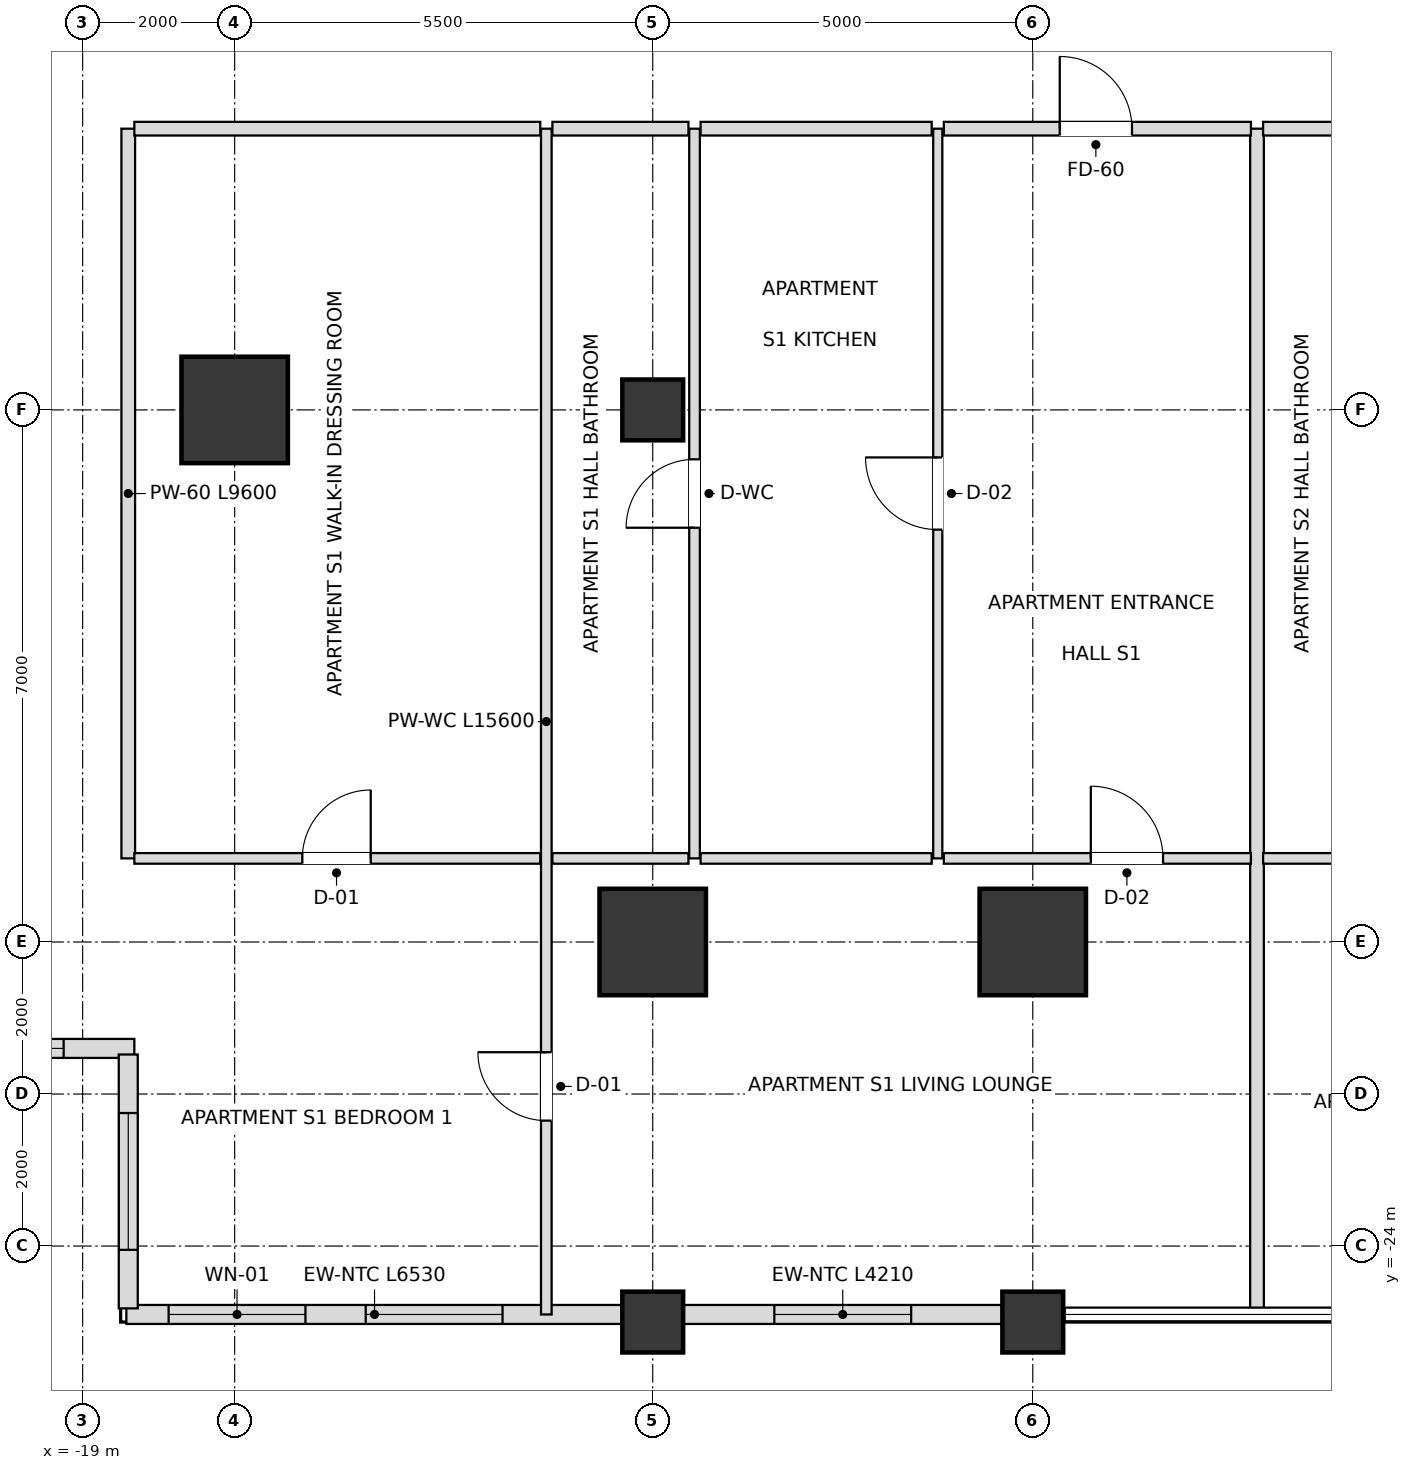
"""IFC4 building model, lengths in metres.
Left out: names, types, materials, properties, quantities, classifications, styles, units other than length and angle.
Written with IfcOpenShell. Run it as: python <this file> out.ifc"""

import sys

from ifc_helpers import new_model, si_unit, direction, frame, frame_2d, origin, origin_2d, place, context, subcontext, project, spatial, rectangle, extrude, element, fill, save


model = new_model("IFC4")
c1 = context("Model", 3, precision=1e-05, world=origin(), true_north=direction((0.0, 1.0)))
c2 = subcontext(c1, "Body", "Model", "MODEL_VIEW")
j1 = project(units=[si_unit("LENGTHUNIT", "METRE"), si_unit("PLANEANGLEUNIT", "RADIAN")], contexts=[c1])
p1 = place(None, origin())
s1 = spatial("IfcSite", under=j1, at=p1, CompositionType="ELEMENT")
p2 = place(p1, origin())
s2 = spatial("IfcBuilding", under=s1, at=p2, CompositionType="ELEMENT")
p3 = place(p2, frame((0.0, 0.0, 43.2)))
s3 = spatial("IfcBuildingStorey", under=s2, at=p3, CompositionType="ELEMENT", Elevation=43.2)
for number, where, z_axis, x_axis in (
    (1, (-11.5, -20.0, 0.0), (0.0, 0.0, 1.0), (1.0, 0.0, 0.0)),
    (2, (-6.5, -20.0, 0.0), (0.0, 0.0, 1.0), (1.0, 0.0, 0.0)),
    (3, (-17.0, -13.0, 0.0), (0.0, 0.0, 1.0), (1.0, 0.0, 0.0)),
):
    element("IfcColumn", number, at=place(p3, frame(where, z_axis=z_axis, x_axis=x_axis)), inside=s3, PredefinedType="USERDEFINED", context=c2, shape_type="SweptSolid", body=[
        extrude(rectangle(XDim=1.4, YDim=1.4, at=origin_2d()), origin(), (0.0, 0.0, 1.0), 3.6),
    ])
for number, where, z_axis, x_axis in (
    (4, (-11.5, -13.0, 0.0), (0.0, 0.0, 1.0), (1.0, 0.0, 0.0)),
    (5, (-11.5, -25.0, 0.0), (0.0, 0.0, 1.0), (1.0, 0.0, 0.0)),
    (6, (-6.5, -25.0, 0.0), (0.0, 0.0, 1.0), (1.0, 0.0, 0.0)),
):
    element("IfcColumn", number, at=place(p3, frame(where, z_axis=z_axis, x_axis=x_axis)), inside=s3, PredefinedType="COLUMN", context=c2, shape_type="SweptSolid", body=[
        extrude(rectangle(XDim=0.8, YDim=0.8, at=origin_2d()), origin(), (0.0, 0.0, 1.0), 3.6),
    ])
p4 = place(p3, frame((-18.425, -24.9, 0.0), z_axis=(0.0, 0.0, 1.0), x_axis=(1.0, 0.0, 0.0)))
e7 = element("IfcWall", 7, at=p4, inside=s3, PredefinedType="SOLIDWALL", context=c2, shape_type="SweptSolid", body=[
    extrude(rectangle(XDim=6.53, YDim=0.25, at=frame_2d((3.265, 0.0))), origin(), (0.0, 0.0, 1.0), 2.736),
])
p5 = place(p4, frame((0.556, 0.0, 0.72)))
e8 = element("IfcOpeningElement", 8, at=p5, cuts=e7, PredefinedType="OPENING", context=c2, shape_type="SweptSolid", body=[
    extrude(rectangle(XDim=1.8, YDim=1.68, at=frame_2d((0.9, 0.84))), frame((0.0, 0.135, 0.0), z_axis=(0.0, -1.0, 0.0), x_axis=(1.0, 0.0, 0.0)), (0.0, 0.0, 1.0), 0.27),
])
p6 = place(p4, frame((3.149, 0.0, 0.72)))
e9 = element("IfcOpeningElement", 9, at=p6, cuts=e7, PredefinedType="OPENING", context=c2, shape_type="SweptSolid", body=[
    extrude(rectangle(XDim=1.8, YDim=1.68, at=frame_2d((0.9, 0.84))), frame((0.0, 0.135, 0.0), z_axis=(0.0, -1.0, 0.0), x_axis=(1.0, 0.0, 0.0)), (0.0, 0.0, 1.0), 0.27),
])
p7 = place(p3, frame((-11.105, -24.9, 0.0), z_axis=(0.0, 0.0, 1.0), x_axis=(1.0, 0.0, 0.0)))
e10 = element("IfcWall", 10, at=p7, inside=s3, PredefinedType="SOLIDWALL", context=c2, shape_type="SweptSolid", body=[
    extrude(rectangle(XDim=4.21, YDim=0.25, at=frame_2d((2.105, 0.0))), origin(), (0.0, 0.0, 1.0), 2.736),
])
p8 = place(p7, frame((1.205, 0.0, 0.72)))
e11 = element("IfcOpeningElement", 11, at=p8, cuts=e10, PredefinedType="OPENING", context=c2, shape_type="SweptSolid", body=[
    extrude(rectangle(XDim=1.8, YDim=1.68, at=frame_2d((0.9, 0.84))), frame((0.0, 0.135, 0.0), z_axis=(0.0, -1.0, 0.0), x_axis=(1.0, 0.0, 0.0)), (0.0, 0.0, 1.0), 0.27),
])
p9 = place(p3, frame((-21.98, -21.4, 0.0), z_axis=(0.0, 0.0, 1.0), x_axis=(1.0, 0.0, 0.0)))
e12 = element("IfcWall", 12, at=p9, inside=s3, PredefinedType="SOLIDWALL", context=c2, shape_type="SweptSolid", body=[
    extrude(rectangle(XDim=3.66, YDim=0.25, at=frame_2d((1.83, 0.0))), origin(), (0.0, 0.0, 1.0), 2.736),
])
p10 = place(p9, frame((0.93, 0.0, 0.72)))
e13 = element("IfcOpeningElement", 13, at=p10, cuts=e12, PredefinedType="OPENING", context=c2, shape_type="SweptSolid", body=[
    extrude(rectangle(XDim=1.8, YDim=1.68, at=frame_2d((0.9, 0.84))), frame((0.0, 0.135, 0.0), z_axis=(0.0, -1.0, 0.0), x_axis=(1.0, 0.0, 0.0)), (0.0, 0.0, 1.0), 0.27),
])
p11 = place(p3, frame((-18.4, -21.48, 0.0), z_axis=(0.0, 0.0, 1.0), x_axis=(0.0, -1.0, 0.0)))
e14 = element("IfcWall", 14, at=p11, inside=s3, PredefinedType="SOLIDWALL", context=c2, shape_type="SweptSolid", body=[
    extrude(rectangle(XDim=3.34, YDim=0.25, at=frame_2d((1.67, 0.0))), origin(), (0.0, 0.0, 1.0), 2.736),
])
p12 = place(p11, frame((0.77, 0.0, 0.72)))
e15 = element("IfcOpeningElement", 15, at=p12, cuts=e14, PredefinedType="OPENING", context=c2, shape_type="SweptSolid", body=[
    extrude(rectangle(XDim=1.8, YDim=1.68, at=frame_2d((0.9, 0.84))), frame((0.0, 0.135, 0.0), z_axis=(0.0, -1.0, 0.0), x_axis=(1.0, 0.0, 0.0)), (0.0, 0.0, 1.0), 0.27),
])
p13 = place(p3, frame((-18.4, -18.9, 0.0), z_axis=(0.0, 0.0, 1.0), x_axis=(0.0, 1.0, 0.0)))
e16 = element("IfcWall", 16, at=p13, inside=s3, PredefinedType="PARTITIONING", context=c2, shape_type="SweptSolid", body=[
    extrude(rectangle(XDim=9.6, YDim=0.18, at=frame_2d((4.8, 0.0))), origin(), (0.0, 0.0, 1.0), 2.736),
])
p14 = place(p3, frame((-12.9, -24.9, 0.0), z_axis=(0.0, 0.0, 1.0), x_axis=(0.0, 1.0, 0.0)))
e17 = element("IfcWall", 17, at=p14, inside=s3, PredefinedType="PARTITIONING", context=c2, shape_type="SweptSolid", body=[
    extrude(rectangle(XDim=15.6, YDim=0.14, at=frame_2d((7.8, 0.0))), origin(), (0.0, 0.0, 1.0), 2.736),
])
p15 = place(p14, frame((2.55, 0.0, 0.0)))
e18 = element("IfcOpeningElement", 18, at=p15, cuts=e17, PredefinedType="OPENING", context=c2, shape_type="SweptSolid", body=[
    extrude(rectangle(XDim=0.9, YDim=2.1, at=frame_2d((0.45, 1.05))), frame((0.0, 0.08, 0.0), z_axis=(0.0, -1.0, 0.0), x_axis=(1.0, 0.0, 0.0)), (0.0, 0.0, 1.0), 0.16),
])
p16 = place(p3, frame((-10.95, -18.9, 0.0), z_axis=(0.0, 0.0, 1.0), x_axis=(0.0, 1.0, 0.0)))
e19 = element("IfcWall", 19, at=p16, inside=s3, PredefinedType="PARTITIONING", context=c2, shape_type="SweptSolid", body=[
    extrude(rectangle(XDim=9.6, YDim=0.14, at=frame_2d((4.8, 0.0))), origin(), (0.0, 0.0, 1.0), 2.816),
])
p17 = place(p16, frame((4.35, 0.0, 0.0)))
e20 = element("IfcOpeningElement", 20, at=p17, cuts=e19, PredefinedType="OPENING", context=c2, shape_type="SweptSolid", body=[
    extrude(rectangle(XDim=0.9, YDim=2.1, at=frame_2d((0.45, 1.05))), frame((0.0, 0.08, 0.0), z_axis=(0.0, -1.0, 0.0), x_axis=(1.0, 0.0, 0.0)), (0.0, 0.0, 1.0), 0.16),
])
p18 = place(p3, frame((-7.75, -18.9, 0.0), z_axis=(0.0, 0.0, 1.0), x_axis=(0.0, 1.0, 0.0)))
e21 = element("IfcWall", 21, at=p18, inside=s3, PredefinedType="PARTITIONING", context=c2, shape_type="SweptSolid", body=[
    extrude(rectangle(XDim=9.6, YDim=0.12, at=frame_2d((4.8, 0.0))), origin(), (0.0, 0.0, 1.0), 2.816),
])
p19 = place(p18, frame((4.325, 0.0, 0.0)))
e22 = element("IfcOpeningElement", 22, at=p19, cuts=e21, PredefinedType="OPENING", context=c2, shape_type="SweptSolid", body=[
    extrude(rectangle(XDim=0.95, YDim=2.1, at=frame_2d((0.475, 1.05))), frame((0.0, 0.07, 0.0), z_axis=(0.0, -1.0, 0.0), x_axis=(1.0, 0.0, 0.0)), (0.0, 0.0, 1.0), 0.14),
])
p20 = place(p3, frame((-3.55, -24.9, 0.0), z_axis=(0.0, 0.0, 1.0), x_axis=(0.0, 1.0, 0.0)))
e23 = element("IfcWall", 23, at=p20, inside=s3, PredefinedType="PARTITIONING", context=c2, shape_type="SweptSolid", body=[
    extrude(rectangle(XDim=15.6, YDim=0.18, at=frame_2d((7.8, 0.0))), origin(), (0.0, 0.0, 1.0), 2.816),
])
p21 = place(p3, frame((-18.32, -18.9, 0.0), z_axis=(0.0, 0.0, 1.0), x_axis=(1.0, 0.0, 0.0)))
e24 = element("IfcWall", 24, at=p21, inside=s3, PredefinedType="PARTITIONING", context=c2, shape_type="SweptSolid", body=[
    extrude(rectangle(XDim=5.34, YDim=0.14, at=frame_2d((2.67, 0.0))), origin(), (0.0, 0.0, 1.0), 2.736),
])
p22 = place(p21, frame((2.21, 0.0, 0.0)))
e25 = element("IfcOpeningElement", 25, at=p22, cuts=e24, PredefinedType="OPENING", context=c2, shape_type="SweptSolid", body=[
    extrude(rectangle(XDim=0.9, YDim=2.1, at=frame_2d((0.45, 1.05))), frame((0.0, 0.08, 0.0), z_axis=(0.0, -1.0, 0.0), x_axis=(1.0, 0.0, 0.0)), (0.0, 0.0, 1.0), 0.16),
])
p23 = place(p3, frame((-12.82, -18.9, 0.0), z_axis=(0.0, 0.0, 1.0), x_axis=(1.0, 0.0, 0.0)))
e26 = element("IfcWall", 26, at=p23, inside=s3, PredefinedType="PARTITIONING", context=c2, shape_type="SweptSolid", body=[
    extrude(rectangle(XDim=1.79, YDim=0.14, at=frame_2d((0.895, 0.0))), origin(), (0.0, 0.0, 1.0), 2.736),
])
p24 = place(p3, frame((-10.87, -18.9, 0.0), z_axis=(0.0, 0.0, 1.0), x_axis=(1.0, 0.0, 0.0)))
e27 = element("IfcWall", 27, at=p24, inside=s3, PredefinedType="PARTITIONING", context=c2, shape_type="SweptSolid", body=[
    extrude(rectangle(XDim=3.04, YDim=0.14, at=frame_2d((1.52, 0.0))), origin(), (0.0, 0.0, 1.0), 3.38),
])
p25 = place(p3, frame((-7.67, -18.9, 0.0), z_axis=(0.0, 0.0, 1.0), x_axis=(1.0, 0.0, 0.0)))
e28 = element("IfcWall", 28, at=p25, inside=s3, PredefinedType="PARTITIONING", context=c2, shape_type="SweptSolid", body=[
    extrude(rectangle(XDim=4.04, YDim=0.14, at=frame_2d((2.02, 0.0))), origin(), (0.0, 0.0, 1.0), 2.816),
])
p26 = place(p25, frame((1.934, 0.0, 0.0)))
e29 = element("IfcOpeningElement", 29, at=p26, cuts=e28, PredefinedType="OPENING", context=c2, shape_type="SweptSolid", body=[
    extrude(rectangle(XDim=0.95, YDim=2.1, at=frame_2d((0.475, 1.05))), frame((0.0, 0.08, 0.0), z_axis=(0.0, -1.0, 0.0), x_axis=(1.0, 0.0, 0.0)), (0.0, 0.0, 1.0), 0.16),
])
p27 = place(p3, frame((-3.47, -18.9, 0.0), z_axis=(0.0, 0.0, 1.0), x_axis=(1.0, 0.0, 0.0)))
e30 = element("IfcWall", 30, at=p27, inside=s3, PredefinedType="PARTITIONING", context=c2, shape_type="SweptSolid", body=[
    extrude(rectangle(XDim=1.79, YDim=0.14, at=frame_2d((0.895, 0.0))), origin(), (0.0, 0.0, 1.0), 3.38),
])
p28 = place(p3, frame((-18.32, -9.3, 0.0), z_axis=(0.0, 0.0, 1.0), x_axis=(1.0, 0.0, 0.0)))
e31 = element("IfcWall", 31, at=p28, inside=s3, PredefinedType="PARTITIONING", context=c2, shape_type="SweptSolid", body=[
    extrude(rectangle(XDim=5.34, YDim=0.18, at=frame_2d((2.67, 0.0))), origin(), (0.0, 0.0, 1.0), 2.816),
])
p29 = place(p3, frame((-12.82, -9.3, 0.0), z_axis=(0.0, 0.0, 1.0), x_axis=(1.0, 0.0, 0.0)))
e32 = element("IfcWall", 32, at=p29, inside=s3, PredefinedType="PARTITIONING", context=c2, shape_type="SweptSolid", body=[
    extrude(rectangle(XDim=1.79, YDim=0.18, at=frame_2d((0.895, 0.0))), origin(), (0.0, 0.0, 1.0), 3.38),
])
p30 = place(p3, frame((-10.87, -9.3, 0.0), z_axis=(0.0, 0.0, 1.0), x_axis=(1.0, 0.0, 0.0)))
e33 = element("IfcWall", 33, at=p30, inside=s3, PredefinedType="PARTITIONING", context=c2, shape_type="SweptSolid", body=[
    extrude(rectangle(XDim=3.04, YDim=0.18, at=frame_2d((1.52, 0.0))), origin(), (0.0, 0.0, 1.0), 3.38),
])
p31 = place(p3, frame((-7.67, -9.3, 0.0), z_axis=(0.0, 0.0, 1.0), x_axis=(1.0, 0.0, 0.0)))
e34 = element("IfcWall", 34, at=p31, inside=s3, PredefinedType="PARTITIONING", context=c2, shape_type="SweptSolid", body=[
    extrude(rectangle(XDim=4.04, YDim=0.18, at=frame_2d((2.02, 0.0))), origin(), (0.0, 0.0, 1.0), 2.816),
])
p32 = place(p31, frame((1.525, 0.0, 0.0)))
e35 = element("IfcOpeningElement", 35, at=p32, cuts=e34, PredefinedType="OPENING", context=c2, shape_type="SweptSolid", body=[
    extrude(rectangle(XDim=0.95, YDim=2.15, at=frame_2d((0.475, 1.075))), frame((0.0, 0.1, 0.0), z_axis=(0.0, -1.0, 0.0), x_axis=(1.0, 0.0, 0.0)), (0.0, 0.0, 1.0), 0.2),
])
p33 = place(p3, frame((-3.47, -9.3, 0.0), z_axis=(0.0, 0.0, 1.0), x_axis=(1.0, 0.0, 0.0)))
e36 = element("IfcWall", 36, at=p33, inside=s3, PredefinedType="PARTITIONING", context=c2, shape_type="SweptSolid", body=[
    extrude(rectangle(XDim=1.79, YDim=0.18, at=frame_2d((0.895, 0.0))), origin(), (0.0, 0.0, 1.0), 3.38),
])
p34 = place(p5, origin())
e37 = element("IfcWindow", 37, at=p34, inside=s3, PartitioningType="SINGLE_PANEL", PredefinedType="WINDOW", context=c2, shape_type="SweptSolid", body=[
    extrude(rectangle(XDim=1.8, YDim=1.68, at=frame_2d((0.9, 0.84))), frame((0.0, 0.03, 0.0), z_axis=(0.0, -1.0, 0.0), x_axis=(1.0, 0.0, 0.0)), (0.0, 0.0, 1.0), 0.06),
])
fill(e8, e37)
p35 = place(p6, origin())
e38 = element("IfcWindow", 38, at=p35, inside=s3, PartitioningType="SINGLE_PANEL", PredefinedType="WINDOW", context=c2, shape_type="SweptSolid", body=[
    extrude(rectangle(XDim=1.8, YDim=1.68, at=frame_2d((0.9, 0.84))), frame((0.0, 0.03, 0.0), z_axis=(0.0, -1.0, 0.0), x_axis=(1.0, 0.0, 0.0)), (0.0, 0.0, 1.0), 0.06),
])
fill(e9, e38)
p36 = place(p8, origin())
e39 = element("IfcWindow", 39, at=p36, inside=s3, PartitioningType="SINGLE_PANEL", PredefinedType="WINDOW", context=c2, shape_type="SweptSolid", body=[
    extrude(rectangle(XDim=1.8, YDim=1.68, at=frame_2d((0.9, 0.84))), frame((0.0, 0.03, 0.0), z_axis=(0.0, -1.0, 0.0), x_axis=(1.0, 0.0, 0.0)), (0.0, 0.0, 1.0), 0.06),
])
fill(e11, e39)
p37 = place(p10, origin())
e40 = element("IfcWindow", 40, at=p37, inside=s3, PartitioningType="SINGLE_PANEL", PredefinedType="WINDOW", context=c2, shape_type="SweptSolid", body=[
    extrude(rectangle(XDim=1.8, YDim=1.68, at=frame_2d((0.9, 0.84))), frame((0.0, 0.03, 0.0), z_axis=(0.0, -1.0, 0.0), x_axis=(1.0, 0.0, 0.0)), (0.0, 0.0, 1.0), 0.06),
])
fill(e13, e40)
p38 = place(p12, origin())
e41 = element("IfcWindow", 41, at=p38, inside=s3, PartitioningType="SINGLE_PANEL", PredefinedType="WINDOW", context=c2, shape_type="SweptSolid", body=[
    extrude(rectangle(XDim=1.8, YDim=1.68, at=frame_2d((0.9, 0.84))), frame((0.0, 0.03, 0.0), z_axis=(0.0, -1.0, 0.0), x_axis=(1.0, 0.0, 0.0)), (0.0, 0.0, 1.0), 0.06),
])
fill(e15, e41)
p39 = place(p32, origin())
e42 = element("IfcDoor", 42, at=p39, inside=s3, OperationType="SINGLE_SWING_LEFT", PredefinedType="DOOR", context=c2, shape_type="SweptSolid", body=[
    extrude(rectangle(XDim=0.95, YDim=2.15, at=frame_2d((0.475, 1.075))), frame((0.0, 0.025, 0.0), z_axis=(0.0, -1.0, 0.0), x_axis=(1.0, 0.0, 0.0)), (0.0, 0.0, 1.0), 0.05),
])
fill(e35, e42)
p40 = place(p19, origin())
e43 = element("IfcDoor", 43, at=p40, inside=s3, OperationType="SINGLE_SWING_RIGHT", PredefinedType="DOOR", context=c2, shape_type="SweptSolid", body=[
    extrude(rectangle(XDim=0.95, YDim=2.1, at=frame_2d((0.475, 1.05))), frame((0.0, 0.025, 0.0), z_axis=(0.0, -1.0, 0.0), x_axis=(1.0, 0.0, 0.0)), (0.0, 0.0, 1.0), 0.05),
])
fill(e22, e43)
p41 = place(p17, origin())
e44 = element("IfcDoor", 44, at=p41, inside=s3, OperationType="SINGLE_SWING_LEFT", PredefinedType="DOOR", context=c2, shape_type="SweptSolid", body=[
    extrude(rectangle(XDim=0.9, YDim=2.1, at=frame_2d((0.45, 1.05))), frame((0.0, 0.025, 0.0), z_axis=(0.0, -1.0, 0.0), x_axis=(1.0, 0.0, 0.0)), (0.0, 0.0, 1.0), 0.05),
])
fill(e20, e44)
p42 = place(p22, origin())
e45 = element("IfcDoor", 45, at=p42, inside=s3, OperationType="SINGLE_SWING_RIGHT", PredefinedType="DOOR", context=c2, shape_type="SweptSolid", body=[
    extrude(rectangle(XDim=0.9, YDim=2.1, at=frame_2d((0.45, 1.05))), frame((0.0, 0.025, 0.0), z_axis=(0.0, -1.0, 0.0), x_axis=(1.0, 0.0, 0.0)), (0.0, 0.0, 1.0), 0.05),
])
fill(e25, e45)
p43 = place(p26, origin())
e46 = element("IfcDoor", 46, at=p43, inside=s3, OperationType="SINGLE_SWING_LEFT", PredefinedType="DOOR", context=c2, shape_type="SweptSolid", body=[
    extrude(rectangle(XDim=0.95, YDim=2.1, at=frame_2d((0.475, 1.05))), frame((0.0, 0.025, 0.0), z_axis=(0.0, -1.0, 0.0), x_axis=(1.0, 0.0, 0.0)), (0.0, 0.0, 1.0), 0.05),
])
fill(e29, e46)
p44 = place(p15, origin())
e47 = element("IfcDoor", 47, at=p44, inside=s3, OperationType="SINGLE_SWING_RIGHT", PredefinedType="DOOR", context=c2, shape_type="SweptSolid", body=[
    extrude(rectangle(XDim=0.9, YDim=2.1, at=frame_2d((0.45, 1.05))), frame((0.0, 0.025, 0.0), z_axis=(0.0, -1.0, 0.0), x_axis=(1.0, 0.0, 0.0)), (0.0, 0.0, 1.0), 0.05),
])
fill(e18, e47)
save(model, sys.argv[1])
